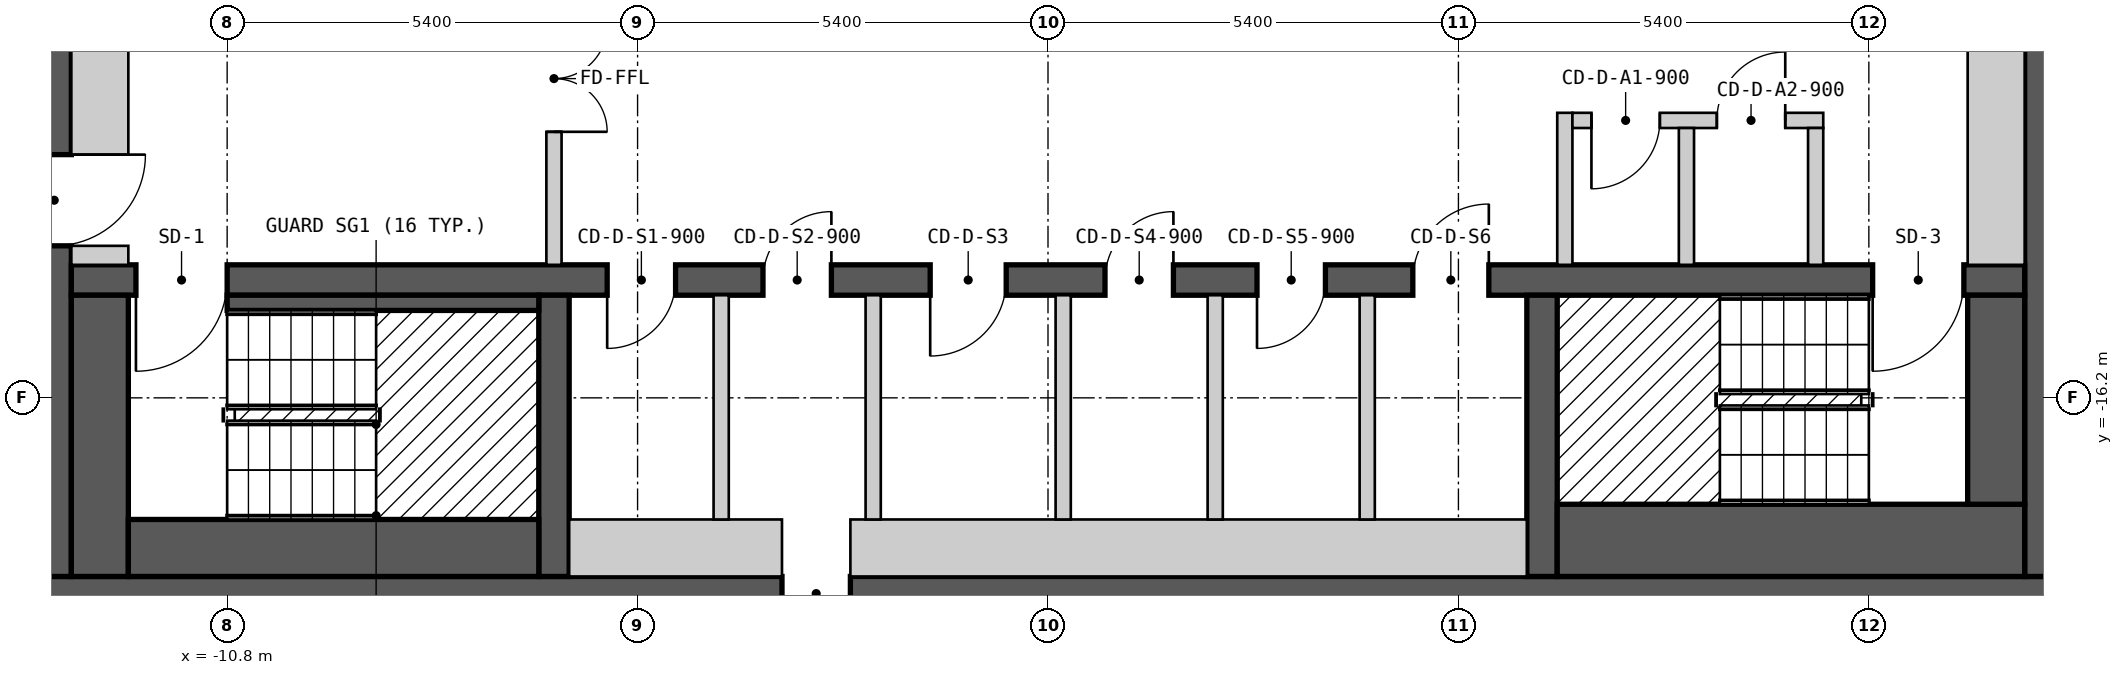
"""IFC4 building model, lengths in metres.
Left out: names, types, materials, properties, quantities, classifications, styles, units other than length and angle.
Written with IfcOpenShell. Run it as: python <this file> out.ifc"""

import sys

from ifc_helpers import new_model, si_unit, direction, frame, frame_2d, origin, place, context, subcontext, project, spatial, polyline, rectangle, outline, extrude, element, fill, save


model = new_model("IFC4")
c1 = context("Model", 3, precision=1e-05, world=origin(), true_north=direction((0.0, 1.0)))
c2 = subcontext(c1, "Body", "Model", "MODEL_VIEW")
j1 = project(units=[si_unit("LENGTHUNIT", "METRE"), si_unit("PLANEANGLEUNIT", "RADIAN")], contexts=[c1])
p1 = place(None, origin())
s1 = spatial("IfcSite", under=j1, at=p1, CompositionType="ELEMENT")
p2 = place(p1, origin())
s2 = spatial("IfcBuilding", under=s1, at=p2, CompositionType="ELEMENT")
p3 = place(p2, frame((0.0, 0.0, 205.8)))
s3 = spatial("IfcBuildingStorey", under=s2, at=p3, CompositionType="ELEMENT", Elevation=205.8)
p4 = place(p3, frame((-13.3, -18.775, 0.0), z_axis=(0.0, 0.0, 1.0), x_axis=(1.0, 0.0, 0.0)))
e1 = element("IfcWall", 1, at=p4, inside=s3, PredefinedType="SHEAR", context=c2, shape_type="SweptSolid", body=[
    extrude(rectangle(XDim=26.6, YDim=0.45, at=frame_2d((13.3, 0.0))), origin(), (0.0, 0.0, 1.0), 2.7),
])
p5 = place(p4, frame((9.8, 0.0, 0.0)))
e2 = element("IfcOpeningElement", 2, at=p5, cuts=e1, PredefinedType="OPENING", context=c2, shape_type="SweptSolid", body=[
    extrude(rectangle(XDim=0.9, YDim=2.1, at=frame_2d((0.45, 1.05))), frame((0.0, 0.235, 0.0), z_axis=(0.0, -1.0, 0.0), x_axis=(1.0, 0.0, 0.0)), (0.0, 0.0, 1.0), 0.47),
])
p6 = place(p3, frame((-13.075, -18.55, 0.0), z_axis=(0.0, 0.0, 1.0), x_axis=(0.0, 1.0, 0.0)))
e3 = element("IfcWall", 3, at=p6, inside=s3, PredefinedType="SHEAR", context=c2, shape_type="SweptSolid", body=[
    extrude(rectangle(XDim=13.1, YDim=0.45, at=frame_2d((6.55, 0.0))), origin(), (0.0, 0.0, 1.0), 2.7),
])
p7 = place(p6, frame((4.35, 0.0, 0.0)))
e4 = element("IfcOpeningElement", 4, at=p7, cuts=e3, PredefinedType="OPENING", context=c2, shape_type="SweptSolid", body=[
    extrude(rectangle(XDim=1.2, YDim=2.1, at=frame_2d((0.6, 1.05))), frame((0.0, 0.235, 0.0), z_axis=(0.0, -1.0, 0.0), x_axis=(1.0, 0.0, 0.0)), (0.0, 0.0, 1.0), 0.47),
])
p8 = place(p3, frame((13.075, -18.55, 0.0), z_axis=(0.0, 0.0, 1.0), x_axis=(0.0, 1.0, 0.0)))
e5 = element("IfcWall", 5, at=p8, inside=s3, PredefinedType="SHEAR", context=c2, shape_type="SweptSolid", body=[
    extrude(rectangle(XDim=13.1, YDim=0.45, at=frame_2d((6.55, 0.0))), origin(), (0.0, 0.0, 1.0), 2.7),
])
p9 = place(p3, frame((-12.85, -14.65, 0.0), z_axis=(0.0, 0.0, 1.0), x_axis=(1.0, 0.0, 0.0)))
e6 = element("IfcWall", 6, at=p9, inside=s3, PredefinedType="SHEAR", context=c2, shape_type="SweptSolid", body=[
    extrude(rectangle(XDim=25.7, YDim=0.4, at=frame_2d((12.85, 0.0))), origin(), (0.0, 0.0, 1.0), 2.7),
])
p10 = place(p9, frame((2.05, 0.0, 0.0), z_axis=(0.0, 0.0, 1.0), x_axis=(-1.0, 0.0, 0.0)))
e7 = element("IfcOpeningElement", 7, at=p10, cuts=e6, PredefinedType="OPENING", context=c2, shape_type="SweptSolid", body=[
    extrude(rectangle(XDim=1.2, YDim=2.1, at=frame_2d((0.6, 1.05))), frame((0.0, 0.21, 0.0), z_axis=(0.0, -1.0, 0.0), x_axis=(1.0, 0.0, 0.0)), (0.0, 0.0, 1.0), 0.42),
])
p11 = place(p9, frame((24.9, 0.0, 0.0), z_axis=(0.0, 0.0, 1.0), x_axis=(-1.0, 0.0, 0.0)))
e8 = element("IfcOpeningElement", 8, at=p11, cuts=e6, PredefinedType="OPENING", context=c2, shape_type="SweptSolid", body=[
    extrude(rectangle(XDim=1.2, YDim=2.1, at=frame_2d((0.6, 1.05))), frame((0.0, 0.21, 0.0), z_axis=(0.0, -1.0, 0.0), x_axis=(1.0, 0.0, 0.0)), (0.0, 0.0, 1.0), 0.42),
])
p12 = place(p9, frame((7.95, 0.0, 0.0), z_axis=(0.0, 0.0, 1.0), x_axis=(-1.0, 0.0, 0.0)))
e9 = element("IfcOpeningElement", 9, at=p12, cuts=e6, PredefinedType="OPENING", context=c2, shape_type="SweptSolid", body=[
    extrude(rectangle(XDim=0.9, YDim=2.1, at=frame_2d((0.45, 1.05))), frame((0.0, 0.21, 0.0), z_axis=(0.0, -1.0, 0.0), x_axis=(1.0, 0.0, 0.0)), (0.0, 0.0, 1.0), 0.42),
])
p13 = place(p9, frame((10.0, 0.0, 0.0), z_axis=(0.0, 0.0, 1.0), x_axis=(-1.0, 0.0, 0.0)))
e10 = element("IfcOpeningElement", 10, at=p13, cuts=e6, PredefinedType="OPENING", context=c2, shape_type="SweptSolid", body=[
    extrude(rectangle(XDim=0.9, YDim=2.1, at=frame_2d((0.45, 1.05))), frame((0.0, 0.21, 0.0), z_axis=(0.0, -1.0, 0.0), x_axis=(1.0, 0.0, 0.0)), (0.0, 0.0, 1.0), 0.42),
])
p14 = place(p9, frame((12.3, 0.0, 0.0), z_axis=(0.0, 0.0, 1.0), x_axis=(-1.0, 0.0, 0.0)))
e11 = element("IfcOpeningElement", 11, at=p14, cuts=e6, PredefinedType="OPENING", context=c2, shape_type="SweptSolid", body=[
    extrude(rectangle(XDim=1.0, YDim=2.1, at=frame_2d((0.5, 1.05))), frame((0.0, 0.21, 0.0), z_axis=(0.0, -1.0, 0.0), x_axis=(1.0, 0.0, 0.0)), (0.0, 0.0, 1.0), 0.42),
])
p15 = place(p9, frame((14.5, 0.0, 0.0), z_axis=(0.0, 0.0, 1.0), x_axis=(-1.0, 0.0, 0.0)))
e12 = element("IfcOpeningElement", 12, at=p15, cuts=e6, PredefinedType="OPENING", context=c2, shape_type="SweptSolid", body=[
    extrude(rectangle(XDim=0.9, YDim=2.1, at=frame_2d((0.45, 1.05))), frame((0.0, 0.21, 0.0), z_axis=(0.0, -1.0, 0.0), x_axis=(1.0, 0.0, 0.0)), (0.0, 0.0, 1.0), 0.42),
])
p16 = place(p9, frame((16.5, 0.0, 0.0), z_axis=(0.0, 0.0, 1.0), x_axis=(-1.0, 0.0, 0.0)))
e13 = element("IfcOpeningElement", 13, at=p16, cuts=e6, PredefinedType="OPENING", context=c2, shape_type="SweptSolid", body=[
    extrude(rectangle(XDim=0.9, YDim=2.1, at=frame_2d((0.45, 1.05))), frame((0.0, 0.21, 0.0), z_axis=(0.0, -1.0, 0.0), x_axis=(1.0, 0.0, 0.0)), (0.0, 0.0, 1.0), 0.42),
])
p17 = place(p9, frame((18.65, 0.0, 0.0), z_axis=(0.0, 0.0, 1.0), x_axis=(-1.0, 0.0, 0.0)))
e14 = element("IfcOpeningElement", 14, at=p17, cuts=e6, PredefinedType="OPENING", context=c2, shape_type="SweptSolid", body=[
    extrude(rectangle(XDim=1.0, YDim=2.1, at=frame_2d((0.5, 1.05))), frame((0.0, 0.21, 0.0), z_axis=(0.0, -1.0, 0.0), x_axis=(1.0, 0.0, 0.0)), (0.0, 0.0, 1.0), 0.42),
])
for number, where, z_axis, x_axis in (
    (15, (-6.5, -18.55, 0.0), (0.0, 0.0, 1.0), (0.0, 1.0, 0.0)),
    (16, (6.5, -18.55, 0.0), (0.0, 0.0, 1.0), (0.0, 1.0, 0.0)),
):
    element("IfcWall", number, at=place(p3, frame(where, z_axis=z_axis, x_axis=x_axis)), inside=s3, PredefinedType="SHEAR", context=c2, shape_type="SweptSolid", body=[
        extrude(rectangle(XDim=3.7, YDim=0.4, at=frame_2d((1.85, 0.0))), origin(), (0.0, 0.0, 1.0), 2.7),
    ])
p18 = place(p3, frame((-15.34, -18.37, 0.0), z_axis=(0.0, 0.0, 1.0), x_axis=(0.866022959057, -0.500004234368, 0.0)))
e17 = element("IfcWall", 17, at=p18, inside=s3, PredefinedType="SOLIDWALL", context=c2, shape_type="SweptSolid", body=[
    extrude(outline(polyline([(0.0, -0.15), (5.0, -0.15), (4.92, 0.15), (0.08, 0.15), (0.0, -0.15)])), origin(), (0.0, 0.0, 1.0), 2.7),
])
p19 = place(p18, frame((0.65, 0.0, 0.15)))
e18 = element("IfcOpeningElement", 18, at=p19, cuts=e17, PredefinedType="OPENING", context=c2, shape_type="SweptSolid", body=[
    extrude(rectangle(XDim=1.2, YDim=2.1, at=frame_2d((0.6, 1.05))), frame((0.0, 0.16, 0.0), z_axis=(0.0, -1.0, 0.0), x_axis=(1.0, 0.0, 0.0)), (0.0, 0.0, 1.0), 0.32),
])
p20 = place(p3, frame((11.01, -20.87, 0.0), z_axis=(0.0, 0.0, 1.0), x_axis=(0.866022959057, 0.500004234368, 0.0)))
e19 = element("IfcWall", 19, at=p20, inside=s3, PredefinedType="SOLIDWALL", context=c2, shape_type="SweptSolid", body=[
    extrude(outline(polyline([(0.0, -0.15), (5.0, -0.15), (4.92, 0.15), (0.08, 0.15), (0.0, -0.15)])), origin(), (0.0, 0.0, 1.0), 2.7),
])
p21 = place(p20, frame((0.65, 0.0, 0.15)))
e20 = element("IfcOpeningElement", 20, at=p21, cuts=e19, PredefinedType="OPENING", context=c2, shape_type="SweptSolid", body=[
    extrude(rectangle(XDim=1.2, YDim=2.1, at=frame_2d((0.6, 1.05))), frame((0.0, 0.16, 0.0), z_axis=(0.0, -1.0, 0.0), x_axis=(1.0, 0.0, 0.0)), (0.0, 0.0, 1.0), 0.32),
])
p22 = place(p3, frame((-12.475, -18.55, 0.0), z_axis=(0.0, 0.0, 1.0), x_axis=(0.0, 1.0, 0.0)))
e21 = element("IfcWall", 21, at=p22, inside=s3, PredefinedType="SOLIDWALL", context=c2, shape_type="SweptSolid", body=[
    extrude(rectangle(XDim=3.7, YDim=0.75, at=frame_2d((1.85, 0.0))), origin(), (0.0, 0.0, 1.0), 2.7),
])
p23 = place(p3, frame((-12.85, -14.325, 0.0), z_axis=(0.0, 0.0, 1.0), x_axis=(1.0, 0.0, 0.0)))
e22 = element("IfcWall", 22, at=p23, inside=s3, PredefinedType="PARTITIONING", context=c2, shape_type="SweptSolid", body=[
    extrude(rectangle(XDim=0.75, YDim=0.25, at=frame_2d((0.375, 0.0))), origin(), (0.0, 0.0, 1.0), 2.7),
])
p24 = place(p3, frame((-12.475, -13.0, 0.0), z_axis=(0.0, 0.0, 1.0), x_axis=(0.0, 1.0, 0.0)))
e23 = element("IfcWall", 23, at=p24, inside=s3, PredefinedType="PARTITIONING", context=c2, shape_type="SweptSolid", body=[
    extrude(rectangle(XDim=3.45, YDim=0.75, at=frame_2d((1.725, 0.0))), origin(), (0.0, 0.0, 1.0), 2.7),
])
p25 = place(p3, frame((-12.1, -18.175, 0.0), z_axis=(0.0, 0.0, 1.0), x_axis=(1.0, 0.0, 0.0)))
e24 = element("IfcWall", 24, at=p25, inside=s3, PredefinedType="SOLIDWALL", context=c2, shape_type="SweptSolid", body=[
    extrude(rectangle(XDim=5.4, YDim=0.75, at=frame_2d((2.7, 0.0))), origin(), (0.0, 0.0, 1.0), 2.7),
])
p26 = place(p3, frame((-10.8, -14.95, 0.0), z_axis=(0.0, 0.0, 1.0), x_axis=(1.0, 0.0, 0.0)))
e25 = element("IfcWall", 25, at=p26, inside=s3, PredefinedType="SOLIDWALL", context=c2, shape_type="SweptSolid", body=[
    extrude(rectangle(XDim=4.1, YDim=0.2, at=frame_2d((2.05, 0.0))), origin(), (0.0, 0.0, 1.0), 2.7),
])
p27 = place(p3, frame((-6.5, -14.45, 0.0), z_axis=(0.0, 0.0, 1.0), x_axis=(0.0, 1.0, 0.0)))
e26 = element("IfcWall", 26, at=p27, inside=s3, PredefinedType="PARTITIONING", context=c2, shape_type="SweptSolid", body=[
    extrude(rectangle(XDim=4.9, YDim=0.2, at=frame_2d((2.45, 0.0))), origin(), (0.0, 0.0, 1.0), 2.7),
])
p28 = place(p27, frame((3.15, 0.0, 0.0), z_axis=(0.0, 0.0, 1.0), x_axis=(-1.0, 0.0, 0.0)))
e27 = element("IfcOpeningElement", 27, at=p28, cuts=e26, PredefinedType="OPENING", context=c2, shape_type="SweptSolid", body=[
    extrude(rectangle(XDim=1.4, YDim=2.1, at=frame_2d((0.7, 1.05))), frame((0.0, 0.11, 0.0), z_axis=(0.0, -1.0, 0.0), x_axis=(1.0, 0.0, 0.0)), (0.0, 0.0, 1.0), 0.22),
])
p29 = place(p3, frame((-6.3, -18.175, 0.0), z_axis=(0.0, 0.0, 1.0), x_axis=(1.0, 0.0, 0.0)))
e28 = element("IfcWall", 28, at=p29, inside=s3, PredefinedType="PARTITIONING", context=c2, shape_type="SweptSolid", body=[
    extrude(rectangle(XDim=2.8, YDim=0.75, at=frame_2d((1.4, 0.0))), origin(), (0.0, 0.0, 1.0), 2.7),
])
p30 = place(p3, frame((-4.3, -17.8, 0.0), z_axis=(0.0, 0.0, 1.0), x_axis=(0.0, 1.0, 0.0)))
e29 = element("IfcWall", 29, at=p30, inside=s3, PredefinedType="PARTITIONING", context=c2, shape_type="SweptSolid", body=[
    extrude(rectangle(XDim=2.95, YDim=0.2, at=frame_2d((1.475, 0.0))), origin(), (0.0, 0.0, 1.0), 2.7),
])
p31 = place(p3, frame((-2.6, -18.175, 0.0), z_axis=(0.0, 0.0, 1.0), x_axis=(1.0, 0.0, 0.0)))
e30 = element("IfcWall", 30, at=p31, inside=s3, PredefinedType="PARTITIONING", context=c2, shape_type="SweptSolid", body=[
    extrude(rectangle(XDim=8.9, YDim=0.75, at=frame_2d((4.45, 0.0))), origin(), (0.0, 0.0, 1.0), 2.7),
])
for number, where, z_axis, x_axis in (
    (31, (-2.3, -17.8, 0.0), (0.0, 0.0, 1.0), (0.0, 1.0, 0.0)),
    (32, (0.2, -17.8, 0.0), (0.0, 0.0, 1.0), (0.0, 1.0, 0.0)),
    (33, (2.2, -17.8, 0.0), (0.0, 0.0, 1.0), (0.0, 1.0, 0.0)),
    (34, (4.2, -17.8, 0.0), (0.0, 0.0, 1.0), (0.0, 1.0, 0.0)),
):
    element("IfcWall", number, at=place(p3, frame(where, z_axis=z_axis, x_axis=x_axis)), inside=s3, PredefinedType="PARTITIONING", context=c2, shape_type="SweptSolid", body=[
        extrude(rectangle(XDim=2.95, YDim=0.2, at=frame_2d((1.475, 0.0))), origin(), (0.0, 0.0, 1.0), 2.7),
    ])
p32 = place(p3, frame((6.7, -18.075, 0.0), z_axis=(0.0, 0.0, 1.0), x_axis=(1.0, 0.0, 0.0)))
e35 = element("IfcWall", 35, at=p32, inside=s3, PredefinedType="SOLIDWALL", context=c2, shape_type="SweptSolid", body=[
    extrude(rectangle(XDim=6.15, YDim=0.95, at=frame_2d((3.075, 0.0))), origin(), (0.0, 0.0, 1.0), 2.7),
])
p33 = place(p3, frame((6.8, -14.45, 0.0), z_axis=(0.0, 0.0, 1.0), x_axis=(0.0, 1.0, 0.0)))
e36 = element("IfcWall", 36, at=p33, inside=s3, PredefinedType="PARTITIONING", context=c2, shape_type="SweptSolid", body=[
    extrude(rectangle(XDim=2.0, YDim=0.2, at=frame_2d((1.0, 0.0))), origin(), (0.0, 0.0, 1.0), 2.7),
])
p34 = place(p3, frame((6.9, -12.55, 0.0), z_axis=(0.0, 0.0, 1.0), x_axis=(1.0, 0.0, 0.0)))
e37 = element("IfcWall", 37, at=p34, inside=s3, PredefinedType="PARTITIONING", context=c2, shape_type="SweptSolid", body=[
    extrude(rectangle(XDim=3.3, YDim=0.2, at=frame_2d((1.65, 0.0))), origin(), (0.0, 0.0, 1.0), 2.7),
])
p35 = place(p34, frame((1.15, 0.0, 0.0), z_axis=(0.0, 0.0, 1.0), x_axis=(-1.0, 0.0, 0.0)))
e38 = element("IfcOpeningElement", 38, at=p35, cuts=e37, PredefinedType="OPENING", context=c2, shape_type="SweptSolid", body=[
    extrude(rectangle(XDim=0.9, YDim=2.1, at=frame_2d((0.45, 1.05))), frame((0.0, 0.11, 0.0), z_axis=(0.0, -1.0, 0.0), x_axis=(1.0, 0.0, 0.0)), (0.0, 0.0, 1.0), 0.22),
])
p36 = place(p34, frame((2.8, 0.0, 0.0), z_axis=(0.0, 0.0, 1.0), x_axis=(-1.0, 0.0, 0.0)))
e39 = element("IfcOpeningElement", 39, at=p36, cuts=e37, PredefinedType="OPENING", context=c2, shape_type="SweptSolid", body=[
    extrude(rectangle(XDim=0.9, YDim=2.1, at=frame_2d((0.45, 1.05))), frame((0.0, 0.11, 0.0), z_axis=(0.0, -1.0, 0.0), x_axis=(1.0, 0.0, 0.0)), (0.0, 0.0, 1.0), 0.22),
])
for number, where, z_axis, x_axis in (
    (40, (8.4, -14.45, 0.0), (0.0, 0.0, 1.0), (0.0, 1.0, 0.0)),
    (41, (10.1, -14.45, 0.0), (0.0, 0.0, 1.0), (0.0, 1.0, 0.0)),
):
    element("IfcWall", number, at=place(p3, frame(where, z_axis=z_axis, x_axis=x_axis)), inside=s3, PredefinedType="PARTITIONING", context=c2, shape_type="SweptSolid", body=[
        extrude(rectangle(XDim=1.8, YDim=0.2, at=frame_2d((0.9, 0.0))), origin(), (0.0, 0.0, 1.0), 2.7),
    ])
p37 = place(p3, frame((12.475, -17.6, 0.0), z_axis=(0.0, 0.0, 1.0), x_axis=(0.0, 1.0, 0.0)))
e42 = element("IfcWall", 42, at=p37, inside=s3, PredefinedType="SOLIDWALL", context=c2, shape_type="SweptSolid", body=[
    extrude(rectangle(XDim=2.75, YDim=0.75, at=frame_2d((1.375, 0.0))), origin(), (0.0, 0.0, 1.0), 2.7),
])
p38 = place(p3, frame((12.475, -14.45, 0.0), z_axis=(0.0, 0.0, 1.0), x_axis=(0.0, 1.0, 0.0)))
e43 = element("IfcWall", 43, at=p38, inside=s3, PredefinedType="PARTITIONING", context=c2, shape_type="SweptSolid", body=[
    extrude(rectangle(XDim=8.25, YDim=0.75, at=frame_2d((4.125, 0.0))), origin(), (0.0, 0.0, 1.0), 2.7),
])
p39 = place(p10, origin())
e44 = element("IfcDoor", 44, at=p39, inside=s3, OperationType="SINGLE_SWING_RIGHT", PredefinedType="DOOR", context=c2, shape_type="SweptSolid", body=[
    extrude(rectangle(XDim=1.2, YDim=2.1, at=frame_2d((0.6, 1.05))), frame((0.0, 0.025, 0.0), z_axis=(0.0, -1.0, 0.0), x_axis=(1.0, 0.0, 0.0)), (0.0, 0.0, 1.0), 0.05),
])
fill(e7, e44)
p40 = place(p11, origin())
e45 = element("IfcDoor", 45, at=p40, inside=s3, OperationType="SINGLE_SWING_RIGHT", PredefinedType="DOOR", context=c2, shape_type="SweptSolid", body=[
    extrude(rectangle(XDim=1.2, YDim=2.1, at=frame_2d((0.6, 1.05))), frame((0.0, 0.025, 0.0), z_axis=(0.0, -1.0, 0.0), x_axis=(1.0, 0.0, 0.0)), (0.0, 0.0, 1.0), 0.05),
])
fill(e8, e45)
p41 = place(p7, origin())
e46 = element("IfcDoor", 46, at=p41, inside=s3, OperationType="SINGLE_SWING_RIGHT", PredefinedType="DOOR", context=c2, shape_type="SweptSolid", body=[
    extrude(rectangle(XDim=1.2, YDim=2.1, at=frame_2d((0.6, 1.05))), frame((0.0, 0.025, 0.0), z_axis=(0.0, -1.0, 0.0), x_axis=(1.0, 0.0, 0.0)), (0.0, 0.0, 1.0), 0.05),
])
fill(e4, e46)
p42 = place(p28, origin())
e47 = element("IfcDoor", 47, at=p42, inside=s3, OperationType="DOUBLE_DOOR_SINGLE_SWING", PredefinedType="DOOR", context=c2, shape_type="SweptSolid", body=[
    extrude(rectangle(XDim=1.4, YDim=2.1, at=frame_2d((0.7, 1.05))), frame((0.0, 0.025, 0.0), z_axis=(0.0, -1.0, 0.0), x_axis=(1.0, 0.0, 0.0)), (0.0, 0.0, 1.0), 0.05),
])
fill(e27, e47)
p43 = place(p35, origin())
e48 = element("IfcDoor", 48, at=p43, inside=s3, OperationType="SINGLE_SWING_RIGHT", PredefinedType="DOOR", context=c2, shape_type="SweptSolid", body=[
    extrude(rectangle(XDim=0.9, YDim=2.1, at=frame_2d((0.45, 1.05))), frame((0.0, 0.025, 0.0), z_axis=(0.0, -1.0, 0.0), x_axis=(1.0, 0.0, 0.0)), (0.0, 0.0, 1.0), 0.05),
])
fill(e38, e48)
p44 = place(p36, origin())
e49 = element("IfcDoor", 49, at=p44, inside=s3, OperationType="SINGLE_SWING_LEFT", PredefinedType="DOOR", context=c2, shape_type="SweptSolid", body=[
    extrude(rectangle(XDim=0.9, YDim=2.1, at=frame_2d((0.45, 1.05))), frame((0.0, 0.025, 0.0), z_axis=(0.0, -1.0, 0.0), x_axis=(1.0, 0.0, 0.0)), (0.0, 0.0, 1.0), 0.05),
])
fill(e39, e49)
p45 = place(p12, origin())
e50 = element("IfcDoor", 50, at=p45, inside=s3, OperationType="SINGLE_SWING_RIGHT", PredefinedType="DOOR", context=c2, shape_type="SweptSolid", body=[
    extrude(rectangle(XDim=0.9, YDim=2.1, at=frame_2d((0.45, 1.05))), frame((0.0, 0.025, 0.0), z_axis=(0.0, -1.0, 0.0), x_axis=(1.0, 0.0, 0.0)), (0.0, 0.0, 1.0), 0.05),
])
fill(e9, e50)
p46 = place(p13, origin())
e51 = element("IfcDoor", 51, at=p46, inside=s3, OperationType="SINGLE_SWING_LEFT", PredefinedType="DOOR", context=c2, shape_type="SweptSolid", body=[
    extrude(rectangle(XDim=0.9, YDim=2.1, at=frame_2d((0.45, 1.05))), frame((0.0, 0.025, 0.0), z_axis=(0.0, -1.0, 0.0), x_axis=(1.0, 0.0, 0.0)), (0.0, 0.0, 1.0), 0.05),
])
fill(e10, e51)
p47 = place(p14, origin())
e52 = element("IfcDoor", 52, at=p47, inside=s3, OperationType="SINGLE_SWING_RIGHT", PredefinedType="DOOR", context=c2, shape_type="SweptSolid", body=[
    extrude(rectangle(XDim=1.0, YDim=2.1, at=frame_2d((0.5, 1.05))), frame((0.0, 0.025, 0.0), z_axis=(0.0, -1.0, 0.0), x_axis=(1.0, 0.0, 0.0)), (0.0, 0.0, 1.0), 0.05),
])
fill(e11, e52)
p48 = place(p15, origin())
e53 = element("IfcDoor", 53, at=p48, inside=s3, OperationType="SINGLE_SWING_LEFT", PredefinedType="DOOR", context=c2, shape_type="SweptSolid", body=[
    extrude(rectangle(XDim=0.9, YDim=2.1, at=frame_2d((0.45, 1.05))), frame((0.0, 0.025, 0.0), z_axis=(0.0, -1.0, 0.0), x_axis=(1.0, 0.0, 0.0)), (0.0, 0.0, 1.0), 0.05),
])
fill(e12, e53)
p49 = place(p16, origin())
e54 = element("IfcDoor", 54, at=p49, inside=s3, OperationType="SINGLE_SWING_RIGHT", PredefinedType="DOOR", context=c2, shape_type="SweptSolid", body=[
    extrude(rectangle(XDim=0.9, YDim=2.1, at=frame_2d((0.45, 1.05))), frame((0.0, 0.025, 0.0), z_axis=(0.0, -1.0, 0.0), x_axis=(1.0, 0.0, 0.0)), (0.0, 0.0, 1.0), 0.05),
])
fill(e13, e54)
p50 = place(p17, origin())
e55 = element("IfcDoor", 55, at=p50, inside=s3, OperationType="SINGLE_SWING_LEFT", PredefinedType="DOOR", context=c2, shape_type="SweptSolid", body=[
    extrude(rectangle(XDim=1.0, YDim=2.1, at=frame_2d((0.5, 1.05))), frame((0.0, 0.025, 0.0), z_axis=(0.0, -1.0, 0.0), x_axis=(1.0, 0.0, 0.0)), (0.0, 0.0, 1.0), 0.05),
])
fill(e14, e55)
p51 = place(p5, origin())
e56 = element("IfcDoor", 56, at=p51, inside=s3, OperationType="SINGLE_SWING_RIGHT", PredefinedType="DOOR", context=c2, shape_type="SweptSolid", body=[
    extrude(rectangle(XDim=0.9, YDim=2.1, at=frame_2d((0.45, 1.05))), frame((0.0, 0.025, 0.0), z_axis=(0.0, -1.0, 0.0), x_axis=(1.0, 0.0, 0.0)), (0.0, 0.0, 1.0), 0.05),
])
fill(e2, e56)
save(model, sys.argv[1])
